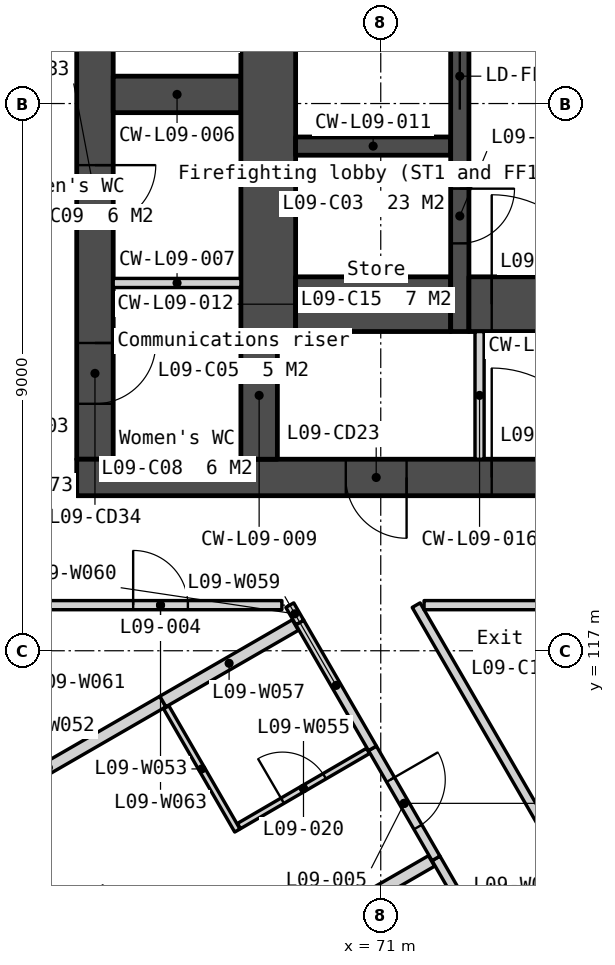
"""IFC4 building model, lengths in metres.
Left out: names, types, materials, properties, quantities, classifications, styles, units other than length and angle.
Written with IfcOpenShell. Run it as: python <this file> out.ifc"""

import sys

from ifc_helpers import new_model, si_unit, direction, frame, frame_2d, origin, place, context, subcontext, project, spatial, polyline, rectangle, outline, extrude, element, fill, save


model = new_model("IFC4")
c1 = context("Model", 3, precision=1e-05, world=origin(), true_north=direction((0.0, 1.0)))
c2 = subcontext(c1, "Body", "Model", "MODEL_VIEW")
j1 = project(units=[si_unit("LENGTHUNIT", "METRE"), si_unit("PLANEANGLEUNIT", "RADIAN")], contexts=[c1])
p1 = place(None, origin())
s1 = spatial("IfcSite", under=j1, at=p1, CompositionType="ELEMENT")
p2 = place(p1, origin())
s2 = spatial("IfcBuilding", under=s1, at=p2, CompositionType="ELEMENT")
p3 = place(p2, frame((0.0, 0.0, 45.5)))
s3 = spatial("IfcBuildingStorey", under=s2, at=p3, CompositionType="ELEMENT", Elevation=45.5)
p4 = place(p3, frame((66.3, 133.95, 0.0), z_axis=(0.0, 0.0, 1.0), x_axis=(0.0, -1.0, 0.0)))
e1 = element("IfcWall", 1, at=p4, inside=s3, PredefinedType="SOLIDWALL", context=c2, shape_type="SweptSolid", body=[
    extrude(rectangle(XDim=13.8, YDim=0.6, at=frame_2d((6.9, 0.0))), origin(), (0.0, 0.0, 1.0), 3.35),
])
p5 = place(p4, frame((0.6, 0.0, 0.0)))
e2 = element("IfcOpeningElement", 2, at=p5, cuts=e1, PredefinedType="OPENING", context=c2, shape_type="SweptSolid", body=[
    extrude(rectangle(XDim=1.1, YDim=2.1, at=frame_2d((0.55, 1.05))), frame((0.0, 0.31, 0.0), z_axis=(0.0, -1.0, 0.0), x_axis=(1.0, 0.0, 0.0)), (0.0, 0.0, 1.0), 0.62),
])
p6 = place(p4, frame((8.963, 0.0, 0.0)))
e3 = element("IfcOpeningElement", 3, at=p6, cuts=e1, PredefinedType="OPENING", context=c2, shape_type="SweptSolid", body=[
    extrude(rectangle(XDim=1.0, YDim=2.1, at=frame_2d((0.5, 1.05))), frame((0.0, 0.31, 0.0), z_axis=(0.0, -1.0, 0.0), x_axis=(1.0, 0.0, 0.0)), (0.0, 0.0, 1.0), 0.62),
])
p7 = place(p4, frame((11.888, 0.0, 0.0)))
e4 = element("IfcOpeningElement", 4, at=p7, cuts=e1, PredefinedType="OPENING", context=c2, shape_type="SweptSolid", body=[
    extrude(rectangle(XDim=1.0, YDim=2.1, at=frame_2d((0.5, 1.05))), frame((0.0, 0.31, 0.0), z_axis=(0.0, -1.0, 0.0), x_axis=(1.0, 0.0, 0.0)), (0.0, 0.0, 1.0), 0.62),
])
p8 = place(p3, frame((66.0, 119.85, 0.0), z_axis=(0.0, 0.0, 1.0), x_axis=(1.0, 0.0, 0.0)))
e5 = element("IfcWall", 5, at=p8, inside=s3, PredefinedType="SOLIDWALL", context=c2, shape_type="SweptSolid", body=[
    extrude(rectangle(XDim=28.0, YDim=0.6, at=frame_2d((14.0, 0.0))), origin(), (0.0, 0.0, 1.0), 3.35),
])
p9 = place(p8, frame((6.825, 0.0, 0.0)))
e6 = element("IfcOpeningElement", 6, at=p9, cuts=e5, PredefinedType="OPENING", context=c2, shape_type="SweptSolid", body=[
    extrude(rectangle(XDim=1.8, YDim=2.1, at=frame_2d((0.9, 1.05))), frame((0.0, 0.31, 0.0), z_axis=(0.0, -1.0, 0.0), x_axis=(1.0, 0.0, 0.0)), (0.0, 0.0, 1.0), 0.62),
])
p10 = place(p8, frame((15.85, 0.0, 0.0)))
e7 = element("IfcOpeningElement", 7, at=p10, cuts=e5, PredefinedType="OPENING", context=c2, shape_type="SweptSolid", body=[
    extrude(rectangle(XDim=1.5, YDim=2.1, at=frame_2d((0.75, 1.05))), frame((0.0, 0.31, 0.0), z_axis=(0.0, -1.0, 0.0), x_axis=(1.0, 0.0, 0.0)), (0.0, 0.0, 1.0), 0.62),
])
p11 = place(p8, frame((19.375, 0.0, 0.0)))
e8 = element("IfcOpeningElement", 8, at=p11, cuts=e5, PredefinedType="OPENING", context=c2, shape_type="SweptSolid", body=[
    extrude(rectangle(XDim=1.8, YDim=2.1, at=frame_2d((0.9, 1.05))), frame((0.0, 0.31, 0.0), z_axis=(0.0, -1.0, 0.0), x_axis=(1.0, 0.0, 0.0)), (0.0, 0.0, 1.0), 0.62),
])
p12 = place(p8, frame((4.425, 0.0, 0.0)))
e9 = element("IfcOpeningElement", 9, at=p12, cuts=e5, PredefinedType="OPENING", context=c2, shape_type="SweptSolid", body=[
    extrude(rectangle(XDim=1.0, YDim=2.1, at=frame_2d((0.5, 1.05))), frame((0.0, 0.31, 0.0), z_axis=(0.0, -1.0, 0.0), x_axis=(1.0, 0.0, 0.0)), (0.0, 0.0, 1.0), 0.62),
])
p13 = place(p8, frame((9.783, 0.0, 0.0)))
e10 = element("IfcOpeningElement", 10, at=p13, cuts=e5, PredefinedType="OPENING", context=c2, shape_type="SweptSolid", body=[
    extrude(rectangle(XDim=1.0, YDim=2.1, at=frame_2d((0.5, 1.05))), frame((0.0, 0.31, 0.0), z_axis=(0.0, -1.0, 0.0), x_axis=(1.0, 0.0, 0.0)), (0.0, 0.0, 1.0), 0.62),
])
p14 = place(p8, frame((11.525, 0.0, 0.0)))
e11 = element("IfcOpeningElement", 11, at=p14, cuts=e5, PredefinedType="OPENING", context=c2, shape_type="SweptSolid", body=[
    extrude(rectangle(XDim=1.0, YDim=2.1, at=frame_2d((0.5, 1.05))), frame((0.0, 0.31, 0.0), z_axis=(0.0, -1.0, 0.0), x_axis=(1.0, 0.0, 0.0)), (0.0, 0.0, 1.0), 0.62),
])
p15 = place(p8, frame((13.658, 0.0, 0.0)))
e12 = element("IfcOpeningElement", 12, at=p15, cuts=e5, PredefinedType="OPENING", context=c2, shape_type="SweptSolid", body=[
    extrude(rectangle(XDim=1.0, YDim=2.1, at=frame_2d((0.5, 1.05))), frame((0.0, 0.31, 0.0), z_axis=(0.0, -1.0, 0.0), x_axis=(1.0, 0.0, 0.0)), (0.0, 0.0, 1.0), 0.62),
])
p16 = place(p8, frame((22.575, 0.0, 0.0)))
e13 = element("IfcOpeningElement", 13, at=p16, cuts=e5, PredefinedType="OPENING", context=c2, shape_type="SweptSolid", body=[
    extrude(rectangle(XDim=1.0, YDim=2.1, at=frame_2d((0.5, 1.05))), frame((0.0, 0.31, 0.0), z_axis=(0.0, -1.0, 0.0), x_axis=(1.0, 0.0, 0.0)), (0.0, 0.0, 1.0), 0.62),
])
p17 = place(p3, frame((66.6, 126.15, 0.0), z_axis=(0.0, 0.0, 1.0), x_axis=(1.0, 0.0, 0.0)))
e14 = element("IfcWall", 14, at=p17, inside=s3, PredefinedType="SOLIDWALL", context=c2, shape_type="SweptSolid", body=[
    extrude(rectangle(XDim=2.1, YDim=0.6, at=frame_2d((1.05, 0.0))), origin(), (0.0, 0.0, 1.0), 3.35),
])
p18 = place(p3, frame((66.6, 123.049, 0.0), z_axis=(0.0, 0.0, 1.0), x_axis=(1.0, 0.0, 0.0)))
e15 = element("IfcWall", 15, at=p18, inside=s3, PredefinedType="PARTITIONING", context=c2, shape_type="SweptSolid", body=[
    extrude(rectangle(XDim=2.1, YDim=0.15, at=frame_2d((1.05, 0.0))), origin(), (0.0, 0.0, 1.0), 3.35),
])
p19 = place(p3, frame((69.15, 133.95, 0.0), z_axis=(0.0, 0.0, 1.0), x_axis=(0.0, -1.0, 0.0)))
e16 = element("IfcWall", 16, at=p19, inside=s3, PredefinedType="SOLIDWALL", context=c2, shape_type="SweptSolid", body=[
    extrude(rectangle(XDim=11.7, YDim=0.9, at=frame_2d((5.85, 0.0))), origin(), (0.0, 0.0, 1.0), 3.35),
])
p20 = place(p3, frame((69.0, 122.25, 0.0), z_axis=(0.0, 0.0, 1.0), x_axis=(0.0, -1.0, 0.0)))
e17 = element("IfcWall", 17, at=p20, inside=s3, PredefinedType="SOLIDWALL", context=c2, shape_type="SweptSolid", body=[
    extrude(rectangle(XDim=2.1, YDim=0.6, at=frame_2d((1.05, 0.0))), origin(), (0.0, 0.0, 1.0), 3.35),
])
p21 = place(p3, frame((69.6, 125.3, 0.0), z_axis=(0.0, 0.0, 1.0), x_axis=(1.0, 0.0, 0.0)))
e18 = element("IfcWall", 18, at=p21, inside=s3, PredefinedType="SOLIDWALL", context=c2, shape_type="SweptSolid", body=[
    extrude(rectangle(XDim=2.55, YDim=0.3, at=frame_2d((1.275, 0.0))), origin(), (0.0, 0.0, 1.0), 3.35),
])
p22 = place(p3, frame((69.6, 122.7, 0.0), z_axis=(0.0, 0.0, 1.0), x_axis=(1.0, 0.0, 0.0)))
e19 = element("IfcWall", 19, at=p22, inside=s3, PredefinedType="SOLIDWALL", context=c2, shape_type="SweptSolid", body=[
    extrude(rectangle(XDim=2.55, YDim=0.9, at=frame_2d((1.275, 0.0))), origin(), (0.0, 0.0, 1.0), 3.35),
])
p23 = place(p3, frame((72.3, 133.95, 0.0), z_axis=(0.0, 0.0, 1.0), x_axis=(0.0, -1.0, 0.0)))
e20 = element("IfcWall", 20, at=p23, inside=s3, PredefinedType="SOLIDWALL", context=c2, shape_type="SweptSolid", body=[
    extrude(rectangle(XDim=11.7, YDim=0.3, at=frame_2d((5.85, 0.0))), origin(), (0.0, 0.0, 1.0), 3.35),
])
p24 = place(p23, frame((6.95, 0.0, 0.0)))
e21 = element("IfcOpeningElement", 21, at=p24, cuts=e20, PredefinedType="OPENING", context=c2, shape_type="SweptSolid", body=[
    extrude(rectangle(XDim=1.1, YDim=2.1, at=frame_2d((0.55, 1.05))), frame((0.0, 0.16, 0.0), z_axis=(0.0, -1.0, 0.0), x_axis=(1.0, 0.0, 0.0)), (0.0, 0.0, 1.0), 0.32),
])
p25 = place(p23, frame((9.35, 0.0, 0.0)))
e22 = element("IfcOpeningElement", 22, at=p25, cuts=e20, PredefinedType="OPENING", context=c2, shape_type="SweptSolid", body=[
    extrude(rectangle(XDim=0.9, YDim=2.1, at=frame_2d((0.45, 1.05))), frame((0.0, 0.16, 0.0), z_axis=(0.0, -1.0, 0.0), x_axis=(1.0, 0.0, 0.0)), (0.0, 0.0, 1.0), 0.32),
])
p26 = place(p23, frame((5.1, 0.0, 0.0)))
e23 = element("IfcOpeningElement", 23, at=p26, cuts=e20, PredefinedType="OPENING", context=c2, shape_type="SweptSolid", body=[
    extrude(rectangle(XDim=1.0, YDim=2.1, at=frame_2d((0.5, 1.05))), frame((0.0, 0.16, 0.0), z_axis=(0.0, -1.0, 0.0), x_axis=(1.0, 0.0, 0.0)), (0.0, 0.0, 1.0), 0.32),
])
p27 = place(p3, frame((72.45, 122.7, 0.0), z_axis=(0.0, 0.0, 1.0), x_axis=(1.0, 0.0, 0.0)))
e24 = element("IfcWall", 24, at=p27, inside=s3, PredefinedType="SOLIDWALL", context=c2, shape_type="SweptSolid", body=[
    extrude(rectangle(XDim=2.55, YDim=0.9, at=frame_2d((1.275, 0.0))), origin(), (0.0, 0.0, 1.0), 3.35),
])
p28 = place(p27, frame((0.375, 0.0, 0.0)))
e25 = element("IfcOpeningElement", 25, at=p28, cuts=e24, PredefinedType="OPENING", context=c2, shape_type="SweptSolid", body=[
    extrude(rectangle(XDim=1.8, YDim=2.1, at=frame_2d((0.9, 1.05))), frame((0.0, 0.46, 0.0), z_axis=(0.0, -1.0, 0.0), x_axis=(1.0, 0.0, 0.0)), (0.0, 0.0, 1.0), 0.92),
])
p29 = place(p3, frame((72.625, 122.25, 0.0), z_axis=(0.0, 0.0, 1.0), x_axis=(0.0, -1.0, 0.0)))
e26 = element("IfcWall", 26, at=p29, inside=s3, PredefinedType="PARTITIONING", context=c2, shape_type="SweptSolid", body=[
    extrude(rectangle(XDim=2.1, YDim=0.15, at=frame_2d((1.05, 0.0))), origin(), (0.0, 0.0, 1.0), 3.35),
])
p30 = place(p3, frame((54.495, 129.397, -0.15), z_axis=(0.0, 0.0, 1.0), x_axis=(0.499999201451, -0.866025864826, 0.0)))
e27 = element("IfcWall", 27, at=p30, inside=s3, PredefinedType="SOLIDWALL", context=c2, shape_type="SweptSolid", body=[
    extrude(outline(polyline([(44.8, 0.0), (44.8, 3.5), (0.0, 3.5), (0.0, 0.0), (44.8, 0.0)])), frame((0.0, 0.225, 0.0), z_axis=(0.0, -1.0, 0.0), x_axis=(1.0, 0.0, 0.0)), (0.0, 0.0, 1.0), 0.45),
])
p31 = place(p30, frame((3.03, 0.0, 1.05)))
e28 = element("IfcOpeningElement", 28, at=p31, cuts=e27, PredefinedType="OPENING", context=c2, shape_type="SweptSolid", body=[
    extrude(rectangle(XDim=1.2, YDim=1.5, at=frame_2d((0.6, 0.75))), frame((0.0, 0.235, 0.0), z_axis=(0.0, -1.0, 0.0), x_axis=(1.0, 0.0, 0.0)), (0.0, 0.0, 1.0), 0.47),
])
p32 = place(p30, frame((4.73, 0.0, 1.05)))
e29 = element("IfcOpeningElement", 29, at=p32, cuts=e27, PredefinedType="OPENING", context=c2, shape_type="SweptSolid", body=[
    extrude(rectangle(XDim=1.2, YDim=1.5, at=frame_2d((0.6, 0.75))), frame((0.0, 0.235, 0.0), z_axis=(0.0, -1.0, 0.0), x_axis=(1.0, 0.0, 0.0)), (0.0, 0.0, 1.0), 0.47),
])
p33 = place(p30, frame((11.99, 0.0, 1.05)))
e30 = element("IfcOpeningElement", 30, at=p33, cuts=e27, PredefinedType="OPENING", context=c2, shape_type="SweptSolid", body=[
    extrude(rectangle(XDim=1.2, YDim=1.5, at=frame_2d((0.6, 0.75))), frame((0.0, 0.235, 0.0), z_axis=(0.0, -1.0, 0.0), x_axis=(1.0, 0.0, 0.0)), (0.0, 0.0, 1.0), 0.47),
])
p34 = place(p30, frame((13.69, 0.0, 1.05)))
e31 = element("IfcOpeningElement", 31, at=p34, cuts=e27, PredefinedType="OPENING", context=c2, shape_type="SweptSolid", body=[
    extrude(rectangle(XDim=1.2, YDim=1.5, at=frame_2d((0.6, 0.75))), frame((0.0, 0.235, 0.0), z_axis=(0.0, -1.0, 0.0), x_axis=(1.0, 0.0, 0.0)), (0.0, 0.0, 1.0), 0.47),
])
p35 = place(p30, frame((20.95, 0.0, 1.05)))
e32 = element("IfcOpeningElement", 32, at=p35, cuts=e27, PredefinedType="OPENING", context=c2, shape_type="SweptSolid", body=[
    extrude(rectangle(XDim=1.2, YDim=1.5, at=frame_2d((0.6, 0.75))), frame((0.0, 0.235, 0.0), z_axis=(0.0, -1.0, 0.0), x_axis=(1.0, 0.0, 0.0)), (0.0, 0.0, 1.0), 0.47),
])
p36 = place(p30, frame((22.65, 0.0, 1.05)))
e33 = element("IfcOpeningElement", 33, at=p36, cuts=e27, PredefinedType="OPENING", context=c2, shape_type="SweptSolid", body=[
    extrude(rectangle(XDim=1.2, YDim=1.5, at=frame_2d((0.6, 0.75))), frame((0.0, 0.235, 0.0), z_axis=(0.0, -1.0, 0.0), x_axis=(1.0, 0.0, 0.0)), (0.0, 0.0, 1.0), 0.47),
])
p37 = place(p30, frame((29.91, 0.0, 1.05)))
e34 = element("IfcOpeningElement", 34, at=p37, cuts=e27, PredefinedType="OPENING", context=c2, shape_type="SweptSolid", body=[
    extrude(rectangle(XDim=1.2, YDim=1.5, at=frame_2d((0.6, 0.75))), frame((0.0, 0.235, 0.0), z_axis=(0.0, -1.0, 0.0), x_axis=(1.0, 0.0, 0.0)), (0.0, 0.0, 1.0), 0.47),
])
p38 = place(p30, frame((31.61, 0.0, 1.05)))
e35 = element("IfcOpeningElement", 35, at=p38, cuts=e27, PredefinedType="OPENING", context=c2, shape_type="SweptSolid", body=[
    extrude(rectangle(XDim=1.2, YDim=1.5, at=frame_2d((0.6, 0.75))), frame((0.0, 0.235, 0.0), z_axis=(0.0, -1.0, 0.0), x_axis=(1.0, 0.0, 0.0)), (0.0, 0.0, 1.0), 0.47),
])
p39 = place(p30, frame((38.87, 0.0, 1.05)))
e36 = element("IfcOpeningElement", 36, at=p39, cuts=e27, PredefinedType="OPENING", context=c2, shape_type="SweptSolid", body=[
    extrude(rectangle(XDim=1.2, YDim=1.5, at=frame_2d((0.6, 0.75))), frame((0.0, 0.235, 0.0), z_axis=(0.0, -1.0, 0.0), x_axis=(1.0, 0.0, 0.0)), (0.0, 0.0, 1.0), 0.47),
])
p40 = place(p30, frame((40.57, 0.0, 1.05)))
e37 = element("IfcOpeningElement", 37, at=p40, cuts=e27, PredefinedType="OPENING", context=c2, shape_type="SweptSolid", body=[
    extrude(rectangle(XDim=1.2, YDim=1.5, at=frame_2d((0.6, 0.75))), frame((0.0, 0.235, 0.0), z_axis=(0.0, -1.0, 0.0), x_axis=(1.0, 0.0, 0.0)), (0.0, 0.0, 1.0), 0.47),
])
p41 = place(p3, frame((71.583, 117.75, 0.0), z_axis=(0.0, 0.0, 1.0), x_axis=(0.500001770766, -0.86602438143, 0.0)))
e38 = element("IfcWall", 38, at=p41, inside=s3, PredefinedType="PARTITIONING", context=c2, shape_type="SweptSolid", body=[
    extrude(rectangle(XDim=13.745, YDim=0.15, at=frame_2d((6.873, 0.0))), origin(), (0.0, 0.0, 1.0), 3.35),
])
p42 = place(p41, frame((6.422, 0.0, 0.0)))
e39 = element("IfcOpeningElement", 39, at=p42, cuts=e38, PredefinedType="OPENING", context=c2, shape_type="SweptSolid", body=[
    extrude(rectangle(XDim=0.9, YDim=2.1, at=frame_2d((0.45, 1.05))), frame((0.0, 0.085, 0.0), z_axis=(0.0, -1.0, 0.0), x_axis=(1.0, 0.0, 0.0)), (0.0, 0.0, 1.0), 0.17),
])
p43 = place(p3, frame((65.89, 110.11, 0.0), z_axis=(0.0, 0.0, 1.0), x_axis=(0.86603516302, 0.499983096127, 0.0)))
e40 = element("IfcWall", 40, at=p43, inside=s3, PredefinedType="PARTITIONING", context=c2, shape_type="SweptSolid", body=[
    extrude(rectangle(XDim=6.865, YDim=0.2, at=frame_2d((3.433, 0.0))), origin(), (0.0, 0.0, 1.0), 3.35),
])
p44 = place(p3, frame((71.909, 113.585, 0.0), z_axis=(0.0, 0.0, 1.0), x_axis=(0.499994808408, -0.866028401131, 0.0)))
e41 = element("IfcWall", 41, at=p44, inside=s3, PredefinedType="PARTITIONING", context=c2, shape_type="SweptSolid", body=[
    extrude(rectangle(XDim=2.69, YDim=0.15, at=frame_2d((1.345, 0.0))), origin(), (0.0, 0.0, 1.0), 3.35),
])
p45 = place(p3, frame((70.864, 115.395, 0.0), z_axis=(0.0, 0.0, 1.0), x_axis=(0.500046000743, -0.865998843614, 0.0)))
e42 = element("IfcWall", 42, at=p45, inside=s3, PredefinedType="PARTITIONING", context=c2, shape_type="SweptSolid", body=[
    extrude(rectangle(XDim=2.09, YDim=0.15, at=frame_2d((1.045, 0.0))), origin(), (0.0, 0.0, 1.0), 3.35),
])
p46 = place(p45, frame((0.595, 0.0, 0.0)))
e43 = element("IfcOpeningElement", 43, at=p46, cuts=e42, PredefinedType="OPENING", context=c2, shape_type="SweptSolid", body=[
    extrude(rectangle(XDim=0.9, YDim=2.1, at=frame_2d((0.45, 1.05))), frame((0.0, 0.085, 0.0), z_axis=(0.0, -1.0, 0.0), x_axis=(1.0, 0.0, 0.0)), (0.0, 0.0, 1.0), 0.17),
])
p47 = place(p3, frame((63.65, 113.99, 0.0), z_axis=(0.0, 0.0, 1.0), x_axis=(0.866027639635, 0.499996127374, 0.0)))
e44 = element("IfcWall", 44, at=p47, inside=s3, PredefinedType="PARTITIONING", context=c2, shape_type="SweptSolid", body=[
    extrude(rectangle(XDim=4.35, YDim=0.2, at=frame_2d((2.175, 0.0))), origin(), (0.0, 0.0, 1.0), 3.35),
])
p48 = place(p3, frame((67.472, 116.07, 0.0), z_axis=(0.0, 0.0, 1.0), x_axis=(0.499954256575, -0.866051812152, 0.0)))
e45 = element("IfcWall", 45, at=p48, inside=s3, PredefinedType="PARTITIONING", context=c2, shape_type="SweptSolid", body=[
    extrude(rectangle(XDim=2.34, YDim=0.1, at=frame_2d((1.17, 0.0))), origin(), (0.0, 0.0, 1.0), 3.35),
])
p49 = place(p3, frame((68.669, 114.117, 0.0), z_axis=(0.0, 0.0, 1.0), x_axis=(0.864063696467, 0.503382487227, 0.0)))
e46 = element("IfcWall", 46, at=p49, inside=s3, PredefinedType="PARTITIONING", context=c2, shape_type="SweptSolid", body=[
    extrude(rectangle(XDim=2.455, YDim=0.1, at=frame_2d((1.228, 0.0))), origin(), (0.0, 0.0, 1.0), 3.35),
])
p50 = place(p49, frame((0.827, 0.0, 0.0)))
e47 = element("IfcOpeningElement", 47, at=p50, cuts=e46, PredefinedType="OPENING", context=c2, shape_type="SweptSolid", body=[
    extrude(rectangle(XDim=0.8, YDim=2.1, at=frame_2d((0.4, 1.05))), frame((0.0, 0.06, 0.0), z_axis=(0.0, -1.0, 0.0), x_axis=(1.0, 0.0, 0.0)), (0.0, 0.0, 1.0), 0.12),
])
p51 = place(p3, frame((67.417, 116.165, 0.0), z_axis=(0.0, 0.0, 1.0), x_axis=(0.866006140796, 0.500033362991, 0.0)))
e48 = element("IfcWall", 48, at=p51, inside=s3, PredefinedType="PARTITIONING", context=c2, shape_type="SweptSolid", body=[
    extrude(rectangle(XDim=2.515, YDim=0.2, at=frame_2d((1.257, 0.0))), origin(), (0.0, 0.0, 1.0), 3.35),
])
p52 = place(p3, frame((69.669, 117.465, 0.0), z_axis=(0.0, 0.0, 1.0), x_axis=(0.499940577336, -0.866059708757, 0.0)))
e49 = element("IfcWall", 49, at=p52, inside=s3, PredefinedType="PARTITIONING", context=c2, shape_type="SweptSolid", body=[
    extrude(rectangle(XDim=2.39, YDim=0.15, at=frame_2d((1.195, 0.0))), origin(), (0.0, 0.0, 1.0), 3.35),
])
p53 = place(p3, frame((69.504, 117.75, 0.0), z_axis=(0.0, 0.0, 1.0), x_axis=(0.500129239174, -0.865950774653, 0.0)))
e50 = element("IfcWall", 50, at=p53, inside=s3, PredefinedType="PARTITIONING", context=c2, shape_type="SweptSolid", body=[
    extrude(rectangle(XDim=0.329, YDim=0.15, at=frame_2d((0.165, 0.0))), origin(), (0.0, 0.0, 1.0), 3.35),
])
p54 = place(p3, frame((65.382, 117.75, 0.0), z_axis=(0.0, 0.0, 1.0), x_axis=(1.0, 0.0, 0.0)))
e51 = element("IfcWall", 51, at=p54, inside=s3, PredefinedType="PARTITIONING", context=c2, shape_type="SweptSolid", body=[
    extrude(rectangle(XDim=3.992, YDim=0.15, at=frame_2d((1.996, 0.0))), origin(), (0.0, 0.0, 1.0), 3.35),
])
p55 = place(p54, frame((1.546, 0.0, 0.0)))
e52 = element("IfcOpeningElement", 52, at=p55, cuts=e51, PredefinedType="OPENING", context=c2, shape_type="SweptSolid", body=[
    extrude(rectangle(XDim=0.9, YDim=2.1, at=frame_2d((0.45, 1.05))), frame((0.0, 0.085, 0.0), z_axis=(0.0, -1.0, 0.0), x_axis=(1.0, 0.0, 0.0)), (0.0, 0.0, 1.0), 0.17),
])
p56 = place(p3, frame((71.712, 117.75, 0.0), z_axis=(0.0, 0.0, 1.0), x_axis=(1.0, 0.0, 0.0)))
e53 = element("IfcWall", 53, at=p56, inside=s3, PredefinedType="PARTITIONING", context=c2, shape_type="SweptSolid", body=[
    extrude(rectangle(XDim=6.743, YDim=0.15, at=frame_2d((3.371, 0.0))), origin(), (0.0, 0.0, 1.0), 3.35),
])
p57 = place(p24, origin())
e54 = element("IfcDoor", 54, at=p57, inside=s3, OperationType="SLIDING_TO_LEFT", PredefinedType="DOOR", context=c2, shape_type="SweptSolid", body=[
    extrude(rectangle(XDim=1.1, YDim=2.1, at=frame_2d((0.55, 1.05))), frame((0.0, 0.025, 0.0), z_axis=(0.0, -1.0, 0.0), x_axis=(1.0, 0.0, 0.0)), (0.0, 0.0, 1.0), 0.05),
])
fill(e21, e54)
p58 = place(p28, origin())
e55 = element("IfcDoor", 55, at=p58, inside=s3, OperationType="DOUBLE_DOOR_DOUBLE_SWING", PredefinedType="DOOR", context=c2, shape_type="SweptSolid", body=[
    extrude(rectangle(XDim=1.8, YDim=2.1, at=frame_2d((0.9, 1.05))), frame((0.0, 0.025, 0.0), z_axis=(0.0, -1.0, 0.0), x_axis=(1.0, 0.0, 0.0)), (0.0, 0.0, 1.0), 0.05),
])
fill(e25, e55)
p59 = place(p9, origin())
e56 = element("IfcDoor", 56, at=p59, inside=s3, OperationType="DOUBLE_DOOR_DOUBLE_SWING", PredefinedType="DOOR", context=c2, shape_type="SweptSolid", body=[
    extrude(rectangle(XDim=1.8, YDim=2.1, at=frame_2d((0.9, 1.05))), frame((0.0, 0.025, 0.0), z_axis=(0.0, -1.0, 0.0), x_axis=(1.0, 0.0, 0.0)), (0.0, 0.0, 1.0), 0.05),
])
fill(e6, e56)
p60 = place(p25, origin())
e57 = element("IfcDoor", 57, at=p60, inside=s3, OperationType="SINGLE_SWING_LEFT", PredefinedType="DOOR", context=c2, shape_type="SweptSolid", body=[
    extrude(rectangle(XDim=0.9, YDim=2.1, at=frame_2d((0.45, 1.05))), frame((0.0, 0.025, 0.0), z_axis=(0.0, -1.0, 0.0), x_axis=(1.0, 0.0, 0.0)), (0.0, 0.0, 1.0), 0.05),
])
fill(e22, e57)
p61 = place(p12, origin())
e58 = element("IfcDoor", 58, at=p61, inside=s3, OperationType="SINGLE_SWING_RIGHT", PredefinedType="DOOR", context=c2, shape_type="SweptSolid", body=[
    extrude(rectangle(XDim=1.0, YDim=2.1, at=frame_2d((0.5, 1.05))), frame((0.0, 0.025, 0.0), z_axis=(0.0, -1.0, 0.0), x_axis=(1.0, 0.0, 0.0)), (0.0, 0.0, 1.0), 0.05),
])
fill(e9, e58)
p62 = place(p6, origin())
e59 = element("IfcDoor", 59, at=p62, inside=s3, OperationType="SINGLE_SWING_LEFT", PredefinedType="DOOR", context=c2, shape_type="SweptSolid", body=[
    extrude(rectangle(XDim=1.0, YDim=2.1, at=frame_2d((0.5, 1.05))), frame((0.0, 0.025, 0.0), z_axis=(0.0, -1.0, 0.0), x_axis=(1.0, 0.0, 0.0)), (0.0, 0.0, 1.0), 0.05),
])
fill(e3, e59)
p63 = place(p7, origin())
e60 = element("IfcDoor", 60, at=p63, inside=s3, OperationType="SINGLE_SWING_LEFT", PredefinedType="DOOR", context=c2, shape_type="SweptSolid", body=[
    extrude(rectangle(XDim=1.0, YDim=2.1, at=frame_2d((0.5, 1.05))), frame((0.0, 0.025, 0.0), z_axis=(0.0, -1.0, 0.0), x_axis=(1.0, 0.0, 0.0)), (0.0, 0.0, 1.0), 0.05),
])
fill(e4, e60)
p64 = place(p55, origin())
e61 = element("IfcDoor", 61, at=p64, inside=s3, OperationType="SINGLE_SWING_LEFT", PredefinedType="DOOR", context=c2, shape_type="SweptSolid", body=[
    extrude(rectangle(XDim=0.9, YDim=2.1, at=frame_2d((0.45, 1.05))), frame((0.0, 0.025, 0.0), z_axis=(0.0, -1.0, 0.0), x_axis=(1.0, 0.0, 0.0)), (0.0, 0.0, 1.0), 0.05),
])
fill(e52, e61)
p65 = place(p46, origin())
e62 = element("IfcDoor", 62, at=p65, inside=s3, OperationType="SINGLE_SWING_LEFT", PredefinedType="DOOR", context=c2, shape_type="SweptSolid", body=[
    extrude(rectangle(XDim=0.9, YDim=2.1, at=frame_2d((0.45, 1.05))), frame((0.0, 0.025, 0.0), z_axis=(0.0, -1.0, 0.0), x_axis=(1.0, 0.0, 0.0)), (0.0, 0.0, 1.0), 0.05),
])
fill(e43, e62)
p66 = place(p50, origin())
e63 = element("IfcDoor", 63, at=p66, inside=s3, OperationType="SINGLE_SWING_LEFT", PredefinedType="DOOR", context=c2, shape_type="SweptSolid", body=[
    extrude(rectangle(XDim=0.8, YDim=2.1, at=frame_2d((0.4, 1.05))), frame((0.0, 0.025, 0.0), z_axis=(0.0, -1.0, 0.0), x_axis=(1.0, 0.0, 0.0)), (0.0, 0.0, 1.0), 0.05),
])
fill(e47, e63)
save(model, sys.argv[1])
